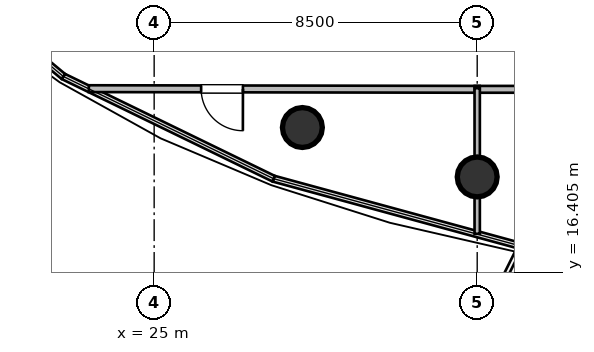
"""IFC4 building model, lengths in metres.
Left out: names, types, materials, properties, quantities, classifications, styles, units other than length and angle.
Written with IfcOpenShell. Run it as: python <this file> out.ifc"""

import sys

from ifc_helpers import new_model, si_unit, direction, frame, frame_2d, origin, origin_2d, place, context, subcontext, project, spatial, rectangle, circle, extrude, element, fill, save


model = new_model("IFC4")
c1 = context("Model", 3, precision=1e-05, world=origin(), true_north=direction((0.0, 1.0)))
c2 = subcontext(c1, "Body", "Model", "MODEL_VIEW")
j1 = project(units=[si_unit("LENGTHUNIT", "METRE"), si_unit("PLANEANGLEUNIT", "RADIAN")], contexts=[c1])
p1 = place(None, origin())
s1 = spatial("IfcSite", under=j1, at=p1, CompositionType="ELEMENT")
p2 = place(p1, origin())
s2 = spatial("IfcBuilding", under=s1, at=p2, CompositionType="ELEMENT")
p3 = place(p2, frame((0.0, 0.0, 228.0)))
s3 = spatial("IfcBuildingStorey", under=s2, at=p3, CompositionType="ELEMENT", Elevation=228.0)
for number, where, z_axis, x_axis in (
    (1, (28.9, 20.22, 0.0), (0.0, 0.0, 1.0), (1.0, 0.0, 0.0)),
    (2, (33.5, 18.92, 0.0), (0.0, 0.0, 1.0), (1.0, 0.0, 0.0)),
):
    element("IfcColumn", number, at=place(p3, frame(where, z_axis=z_axis, x_axis=x_axis)), inside=s3, PredefinedType="COLUMN", context=c2, shape_type="SweptSolid", body=[
        extrude(circle(Radius=0.525, at=origin_2d()), origin(), (0.0, 0.0, 1.0), 3.6),
    ])
p4 = place(p3, frame((33.565, 21.225, 0.0), z_axis=(0.0, 0.0, 1.0), x_axis=(-0.999998619279, 0.001661758222, 0.0)))
e3 = element("IfcWall", 3, at=p4, inside=s3, PredefinedType="PARTITIONING", context=c2, shape_type="SweptSolid", body=[
    extrude(rectangle(XDim=10.284, YDim=0.18, at=frame_2d((5.142, 0.0))), origin(), (0.0, 0.0, 1.0), 2.806),
])
p5 = place(p4, frame((6.229, 0.0, 0.0)))
e4 = element("IfcOpeningElement", 4, at=p5, cuts=e3, PredefinedType="OPENING", context=c2, shape_type="SweptSolid", body=[
    extrude(rectangle(XDim=1.1, YDim=2.1, at=frame_2d((0.55, 1.05))), frame((0.0, 0.1, 0.0), z_axis=(0.0, -1.0, 0.0), x_axis=(1.0, 0.0, 0.0)), (0.0, 0.0, 1.0), 0.2),
])
p6 = place(p3, frame((46.405, 21.225, 0.0), z_axis=(0.0, 0.0, 1.0), x_axis=(-1.0, 0.0, 0.0)))
e5 = element("IfcWall", 5, at=p6, inside=s3, PredefinedType="PARTITIONING", context=c2, shape_type="SweptSolid", body=[
    extrude(rectangle(XDim=12.97, YDim=0.18, at=frame_2d((6.485, 0.0))), origin(), (0.0, 0.0, 1.0), 2.996),
])
p7 = place(p6, frame((5.885, 0.0, 0.0)))
e6 = element("IfcOpeningElement", 6, at=p7, cuts=e5, PredefinedType="OPENING", context=c2, shape_type="SweptSolid", body=[
    extrude(rectangle(XDim=1.2, YDim=2.15, at=frame_2d((0.6, 1.075))), frame((0.0, 0.1, 0.0), z_axis=(0.0, -1.0, 0.0), x_axis=(1.0, 0.0, 0.0)), (0.0, 0.0, 1.0), 0.2),
])
p8 = place(p3, frame((33.5, 21.255, 0.0), z_axis=(0.0, 0.0, 1.0), x_axis=(0.0, -1.0, 0.0)))
e7 = element("IfcWall", 7, at=p8, inside=s3, PredefinedType="PARTITIONING", context=c2, shape_type="SweptSolid", body=[
    extrude(rectangle(XDim=3.831, YDim=0.14, at=frame_2d((1.916, 0.0))), origin(), (0.0, 0.0, 1.0), 3.36),
])
p9 = place(p5, origin())
e8 = element("IfcDoor", 8, at=p9, inside=s3, OperationType="SINGLE_SWING_LEFT", PredefinedType="DOOR", context=c2, shape_type="SweptSolid", body=[
    extrude(rectangle(XDim=1.1, YDim=2.1, at=frame_2d((0.55, 1.05))), frame((0.0, 0.025, 0.0), z_axis=(0.0, -1.0, 0.0), x_axis=(1.0, 0.0, 0.0)), (0.0, 0.0, 1.0), 0.05),
])
fill(e4, e8)
save(model, sys.argv[1])
